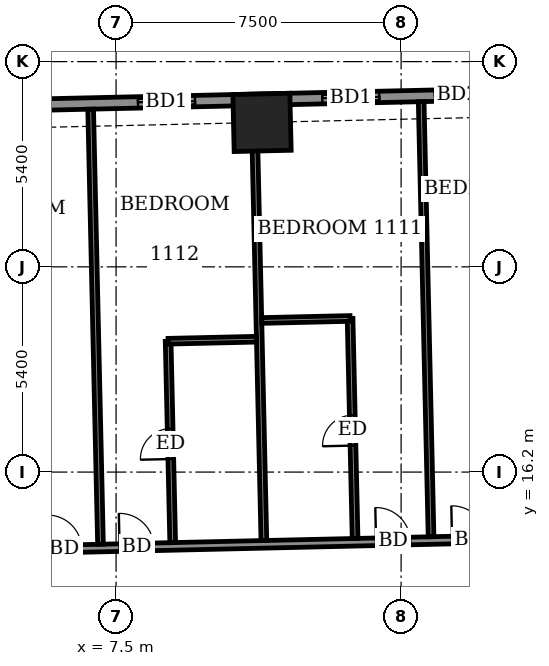
"""IFC4 building model, lengths in metres.
Left out: names, types, materials, properties, quantities, classifications, styles, units other than length and angle.
Written with IfcOpenShell. Run it as: python <this file> out.ifc"""

import sys

from ifc_helpers import new_model, si_unit, direction, frame, frame_2d, origin, origin_2d, place, context, subcontext, project, spatial, rectangle, extrude, element, fill, save


model = new_model("IFC4")
c1 = context("Model", 3, precision=1e-05, world=origin(), true_north=direction((0.0, 1.0)))
c2 = subcontext(c1, "Body", "Model", "MODEL_VIEW")
j1 = project(units=[si_unit("LENGTHUNIT", "METRE"), si_unit("PLANEANGLEUNIT", "RADIAN")], contexts=[c1])
p1 = place(None, origin())
s1 = spatial("IfcSite", under=j1, at=p1, CompositionType="ELEMENT")
p2 = place(p1, origin())
s2 = spatial("IfcBuilding", under=s1, at=p2, CompositionType="ELEMENT")
p3 = place(p2, frame((0.0, 0.0, 48.5)))
s3 = spatial("IfcBuildingStorey", under=s2, at=p3, CompositionType="ELEMENT", Elevation=48.5)
p4 = place(p3, frame((11.34, 25.4, -0.55), z_axis=(0.0, 0.0, 1.0), x_axis=(-0.999741952388, -0.022716263674, 0.0)))
e1 = element("IfcColumn", 1, at=p4, inside=s3, PredefinedType="COLUMN", context=c2, shape_type="SweptSolid", body=[
    extrude(rectangle(XDim=1.5, YDim=1.5, at=origin_2d()), origin(), (0.0, 0.0, 1.0), 3.6),
])
p5 = place(p3, frame((24.423, 26.298, 0.0), z_axis=(0.0, 0.0, 1.0), x_axis=(-0.999742433108, -0.022695097355, 0.0)))
e2 = element("IfcWall", 2, at=p5, inside=s3, PredefinedType="SOLIDWALL", context=c2, shape_type="SweptSolid", body=[
    extrude(rectangle(XDim=52.701, YDim=0.3, at=frame_2d((26.35, 0.0))), origin(), (0.0, 0.0, 1.0), 3.05),
])
p6 = place(p5, frame((2.009, 0.0, 0.0)))
e3 = element("IfcOpeningElement", 3, at=p6, cuts=e2, PredefinedType="OPENING", context=c2, shape_type="SweptSolid", body=[
    extrude(rectangle(XDim=1.5, YDim=2.4, at=frame_2d((0.75, 1.2))), frame((0.0, 0.16, 0.0), z_axis=(0.0, -1.0, 0.0), x_axis=(1.0, 0.0, 0.0)), (0.0, 0.0, 1.0), 0.32),
])
p7 = place(p5, frame((7.337, 0.0, 0.0)))
e4 = element("IfcOpeningElement", 4, at=p7, cuts=e2, PredefinedType="OPENING", context=c2, shape_type="SweptSolid", body=[
    extrude(rectangle(XDim=1.2, YDim=2.4, at=frame_2d((0.6, 1.2))), frame((0.0, 0.16, 0.0), z_axis=(0.0, -1.0, 0.0), x_axis=(1.0, 0.0, 0.0)), (0.0, 0.0, 1.0), 0.32),
])
p8 = place(p5, frame((10.0, 0.0, 0.0)))
e5 = element("IfcOpeningElement", 5, at=p8, cuts=e2, PredefinedType="OPENING", context=c2, shape_type="SweptSolid", body=[
    extrude(rectangle(XDim=1.5, YDim=2.4, at=frame_2d((0.75, 1.2))), frame((0.0, 0.16, 0.0), z_axis=(0.0, -1.0, 0.0), x_axis=(1.0, 0.0, 0.0)), (0.0, 0.0, 1.0), 0.32),
])
p9 = place(p5, frame((14.85, 0.0, 0.0)))
e6 = element("IfcOpeningElement", 6, at=p9, cuts=e2, PredefinedType="OPENING", context=c2, shape_type="SweptSolid", body=[
    extrude(rectangle(XDim=1.5, YDim=2.4, at=frame_2d((0.75, 1.2))), frame((0.0, 0.16, 0.0), z_axis=(0.0, -1.0, 0.0), x_axis=(1.0, 0.0, 0.0)), (0.0, 0.0, 1.0), 0.32),
])
p10 = place(p5, frame((20.638, 0.0, 0.9)))
e7 = element("IfcOpeningElement", 7, at=p10, cuts=e2, PredefinedType="OPENING", context=c2, shape_type="SweptSolid", body=[
    extrude(rectangle(XDim=0.9, YDim=1.5, at=frame_2d((0.45, 0.75))), frame((0.0, 0.16, 0.0), z_axis=(0.0, -1.0, 0.0), x_axis=(1.0, 0.0, 0.0)), (0.0, 0.0, 1.0), 0.32),
])
p11 = place(p5, frame((23.125, 0.0, 0.0)))
e8 = element("IfcOpeningElement", 8, at=p11, cuts=e2, PredefinedType="OPENING", context=c2, shape_type="SweptSolid", body=[
    extrude(rectangle(XDim=1.5, YDim=2.4, at=frame_2d((0.75, 1.2))), frame((0.0, 0.16, 0.0), z_axis=(0.0, -1.0, 0.0), x_axis=(1.0, 0.0, 0.0)), (0.0, 0.0, 1.0), 0.32),
])
p12 = place(p5, frame((27.9, 0.0, 0.0)))
e9 = element("IfcOpeningElement", 9, at=p12, cuts=e2, PredefinedType="OPENING", context=c2, shape_type="SweptSolid", body=[
    extrude(rectangle(XDim=1.5, YDim=2.4, at=frame_2d((0.75, 1.2))), frame((0.0, 0.16, 0.0), z_axis=(0.0, -1.0, 0.0), x_axis=(1.0, 0.0, 0.0)), (0.0, 0.0, 1.0), 0.32),
])
p13 = place(p5, frame((30.862, 0.0, 0.0)))
e10 = element("IfcOpeningElement", 10, at=p13, cuts=e2, PredefinedType="OPENING", context=c2, shape_type="SweptSolid", body=[
    extrude(rectangle(XDim=1.2, YDim=2.4, at=frame_2d((0.6, 1.2))), frame((0.0, 0.16, 0.0), z_axis=(0.0, -1.0, 0.0), x_axis=(1.0, 0.0, 0.0)), (0.0, 0.0, 1.0), 0.32),
])
p14 = place(p5, frame((36.1, 0.0, 0.0)))
e11 = element("IfcOpeningElement", 11, at=p14, cuts=e2, PredefinedType="OPENING", context=c2, shape_type="SweptSolid", body=[
    extrude(rectangle(XDim=1.5, YDim=2.4, at=frame_2d((0.75, 1.2))), frame((0.0, 0.16, 0.0), z_axis=(0.0, -1.0, 0.0), x_axis=(1.0, 0.0, 0.0)), (0.0, 0.0, 1.0), 0.32),
])
p15 = place(p5, frame((40.975, 0.0, 0.0)))
e12 = element("IfcOpeningElement", 12, at=p15, cuts=e2, PredefinedType="OPENING", context=c2, shape_type="SweptSolid", body=[
    extrude(rectangle(XDim=1.5, YDim=2.4, at=frame_2d((0.75, 1.2))), frame((0.0, 0.16, 0.0), z_axis=(0.0, -1.0, 0.0), x_axis=(1.0, 0.0, 0.0)), (0.0, 0.0, 1.0), 0.32),
])
p16 = place(p5, frame((43.788, 0.0, 0.0)))
e13 = element("IfcOpeningElement", 13, at=p16, cuts=e2, PredefinedType="OPENING", context=c2, shape_type="SweptSolid", body=[
    extrude(rectangle(XDim=1.5, YDim=2.4, at=frame_2d((0.75, 1.2))), frame((0.0, 0.16, 0.0), z_axis=(0.0, -1.0, 0.0), x_axis=(1.0, 0.0, 0.0)), (0.0, 0.0, 1.0), 0.32),
])
p17 = place(p5, frame((48.464, 0.0, 0.9)))
e14 = element("IfcOpeningElement", 14, at=p17, cuts=e2, PredefinedType="OPENING", context=c2, shape_type="SweptSolid", body=[
    extrude(rectangle(XDim=2.4, YDim=1.5, at=frame_2d((1.2, 0.75))), frame((0.0, 0.16, 0.0), z_axis=(0.0, -1.0, 0.0), x_axis=(1.0, 0.0, 0.0)), (0.0, 0.0, 1.0), 0.32),
])
p18 = place(p3, frame((7.744, 27.369, 0.0), z_axis=(0.0, 0.0, 1.0), x_axis=(0.999743178102, 0.022662255828, 0.0)))
e15 = element("IfcWall", 15, at=p18, inside=s3, PredefinedType="USERDEFINED", context=c2, shape_type="SweptSolid", body=[
    extrude(rectangle(XDim=6.0, YDim=0.55, at=frame_2d((3.0, 0.0))), origin(), (0.0, 0.0, 1.0), 0.8),
])
p19 = place(p3, frame((16.679, 12.918, 0.0), z_axis=(0.0, 0.0, 1.0), x_axis=(0.999742162372, 0.022707020428, 0.0)))
e16 = element("IfcWall", 16, at=p19, inside=s3, PredefinedType="PARTITIONING", context=c2, shape_type="SweptSolid", body=[
    extrude(rectangle(XDim=10.795, YDim=0.2, at=frame_2d((5.397, 0.0))), origin(), (0.0, 0.0, 1.0), 3.05),
])
p20 = place(p19, frame((5.598, 0.0, 0.0)))
e17 = element("IfcOpeningElement", 17, at=p20, cuts=e16, PredefinedType="OPENING", context=c2, shape_type="SweptSolid", body=[
    extrude(rectangle(XDim=1.0, YDim=2.1, at=frame_2d((0.5, 1.05))), frame((0.0, 0.11, 0.0), z_axis=(0.0, -1.0, 0.0), x_axis=(1.0, 0.0, 0.0)), (0.0, 0.0, 1.0), 0.22),
])
p21 = place(p3, frame((-31.347, 13.329, 0.0), z_axis=(0.0, 0.0, 1.0), x_axis=(0.999742613079, 0.022687168058, 0.0)))
e18 = element("IfcWall", 18, at=p21, inside=s3, PredefinedType="PARTITIONING", context=c2, shape_type="SweptSolid", body=[
    extrude(rectangle(XDim=58.799, YDim=0.2, at=frame_2d((29.399, 0.0))), origin(), (0.0, 0.0, 1.0), 3.05),
])
p22 = place(p21, frame((56.675, 0.0, 0.0)))
e19 = element("IfcOpeningElement", 19, at=p22, cuts=e18, PredefinedType="OPENING", context=c2, shape_type="SweptSolid", body=[
    extrude(rectangle(XDim=1.0, YDim=2.1, at=frame_2d((0.5, 1.05))), frame((0.0, 0.11, 0.0), z_axis=(0.0, -1.0, 0.0), x_axis=(1.0, 0.0, 0.0)), (0.0, 0.0, 1.0), 0.22),
])
p23 = place(p21, frame((52.4, 0.0, 0.0)))
e20 = element("IfcOpeningElement", 20, at=p23, cuts=e18, PredefinedType="OPENING", context=c2, shape_type="SweptSolid", body=[
    extrude(rectangle(XDim=0.9, YDim=2.1, at=frame_2d((0.45, 1.05))), frame((0.0, 0.11, 0.0), z_axis=(0.0, -1.0, 0.0), x_axis=(1.0, 0.0, 0.0)), (0.0, 0.0, 1.0), 0.22),
])
p24 = place(p21, frame((47.7, 0.0, 0.0)))
e21 = element("IfcOpeningElement", 21, at=p24, cuts=e18, PredefinedType="OPENING", context=c2, shape_type="SweptSolid", body=[
    extrude(rectangle(XDim=0.9, YDim=2.1, at=frame_2d((0.45, 1.05))), frame((0.0, 0.11, 0.0), z_axis=(0.0, -1.0, 0.0), x_axis=(1.0, 0.0, 0.0)), (0.0, 0.0, 1.0), 0.22),
])
p25 = place(p21, frame((45.7, 0.0, 0.0)))
e22 = element("IfcOpeningElement", 22, at=p25, cuts=e18, PredefinedType="OPENING", context=c2, shape_type="SweptSolid", body=[
    extrude(rectangle(XDim=0.9, YDim=2.1, at=frame_2d((0.45, 1.05))), frame((0.0, 0.11, 0.0), z_axis=(0.0, -1.0, 0.0), x_axis=(1.0, 0.0, 0.0)), (0.0, 0.0, 1.0), 0.22),
])
p26 = place(p21, frame((38.95, 0.0, 0.0)))
e23 = element("IfcOpeningElement", 23, at=p26, cuts=e18, PredefinedType="OPENING", context=c2, shape_type="SweptSolid", body=[
    extrude(rectangle(XDim=0.9, YDim=2.1, at=frame_2d((0.45, 1.05))), frame((0.0, 0.11, 0.0), z_axis=(0.0, -1.0, 0.0), x_axis=(1.0, 0.0, 0.0)), (0.0, 0.0, 1.0), 0.22),
])
p27 = place(p21, frame((37.05, 0.0, 0.0)))
e24 = element("IfcOpeningElement", 24, at=p27, cuts=e18, PredefinedType="OPENING", context=c2, shape_type="SweptSolid", body=[
    extrude(rectangle(XDim=0.9, YDim=2.1, at=frame_2d((0.45, 1.05))), frame((0.0, 0.11, 0.0), z_axis=(0.0, -1.0, 0.0), x_axis=(1.0, 0.0, 0.0)), (0.0, 0.0, 1.0), 0.22),
])
p28 = place(p21, frame((30.375, 0.0, 0.0)))
e25 = element("IfcOpeningElement", 25, at=p28, cuts=e18, PredefinedType="OPENING", context=c2, shape_type="SweptSolid", body=[
    extrude(rectangle(XDim=0.9, YDim=2.1, at=frame_2d((0.45, 1.05))), frame((0.0, 0.11, 0.0), z_axis=(0.0, -1.0, 0.0), x_axis=(1.0, 0.0, 0.0)), (0.0, 0.0, 1.0), 0.22),
])
p29 = place(p21, frame((28.5, 0.0, 0.0)))
e26 = element("IfcOpeningElement", 26, at=p29, cuts=e18, PredefinedType="OPENING", context=c2, shape_type="SweptSolid", body=[
    extrude(rectangle(XDim=0.9, YDim=2.1, at=frame_2d((0.45, 1.05))), frame((0.0, 0.11, 0.0), z_axis=(0.0, -1.0, 0.0), x_axis=(1.0, 0.0, 0.0)), (0.0, 0.0, 1.0), 0.22),
])
p30 = place(p21, frame((21.825, 0.0, 0.0)))
e27 = element("IfcOpeningElement", 27, at=p30, cuts=e18, PredefinedType="OPENING", context=c2, shape_type="SweptSolid", body=[
    extrude(rectangle(XDim=0.9, YDim=2.1, at=frame_2d((0.45, 1.05))), frame((0.0, 0.11, 0.0), z_axis=(0.0, -1.0, 0.0), x_axis=(1.0, 0.0, 0.0)), (0.0, 0.0, 1.0), 0.22),
])
p31 = place(p21, frame((19.95, 0.0, 0.0)))
e28 = element("IfcOpeningElement", 28, at=p31, cuts=e18, PredefinedType="OPENING", context=c2, shape_type="SweptSolid", body=[
    extrude(rectangle(XDim=0.9, YDim=2.1, at=frame_2d((0.45, 1.05))), frame((0.0, 0.11, 0.0), z_axis=(0.0, -1.0, 0.0), x_axis=(1.0, 0.0, 0.0)), (0.0, 0.0, 1.0), 0.22),
])
p32 = place(p21, frame((13.225, 0.0, 0.0)))
e29 = element("IfcOpeningElement", 29, at=p32, cuts=e18, PredefinedType="OPENING", context=c2, shape_type="SweptSolid", body=[
    extrude(rectangle(XDim=0.9, YDim=2.1, at=frame_2d((0.45, 1.05))), frame((0.0, 0.11, 0.0), z_axis=(0.0, -1.0, 0.0), x_axis=(1.0, 0.0, 0.0)), (0.0, 0.0, 1.0), 0.22),
])
p33 = place(p21, frame((11.25, 0.0, 0.0)))
e30 = element("IfcOpeningElement", 30, at=p33, cuts=e18, PredefinedType="OPENING", context=c2, shape_type="SweptSolid", body=[
    extrude(rectangle(XDim=0.9, YDim=2.1, at=frame_2d((0.45, 1.05))), frame((0.0, 0.11, 0.0), z_axis=(0.0, -1.0, 0.0), x_axis=(1.0, 0.0, 0.0)), (0.0, 0.0, 1.0), 0.22),
])
p34 = place(p21, frame((1.75, 0.0, 0.0)))
e31 = element("IfcOpeningElement", 31, at=p34, cuts=e18, PredefinedType="OPENING", context=c2, shape_type="SweptSolid", body=[
    extrude(rectangle(XDim=1.0, YDim=2.1, at=frame_2d((0.5, 1.05))), frame((0.0, 0.11, 0.0), z_axis=(0.0, -1.0, 0.0), x_axis=(1.0, 0.0, 0.0)), (0.0, 0.0, 1.0), 0.22),
])
p35 = place(p21, frame((6.65, 0.0, 0.0)))
e32 = element("IfcOpeningElement", 32, at=p35, cuts=e18, PredefinedType="OPENING", context=c2, shape_type="SweptSolid", body=[
    extrude(rectangle(XDim=0.9, YDim=2.1, at=frame_2d((0.45, 1.05))), frame((0.0, 0.11, 0.0), z_axis=(0.0, -1.0, 0.0), x_axis=(1.0, 0.0, 0.0)), (0.0, 0.0, 1.0), 0.22),
])
p36 = place(p3, frame((7.09, 14.301, 0.0), z_axis=(0.0, 0.0, 1.0), x_axis=(-0.022621153305, 0.999744108971, 0.0)))
e33 = element("IfcWall", 33, at=p36, inside=s3, PredefinedType="PARTITIONING", context=c2, shape_type="SweptSolid", body=[
    extrude(rectangle(XDim=11.451, YDim=0.15, at=frame_2d((5.726, 0.0))), origin(), (0.0, 0.0, 1.0), 2.55),
])
p37 = place(p3, frame((8.99, 14.344, 0.0), z_axis=(0.0, 0.0, 1.0), x_axis=(-0.022615729912, 0.999744231672, 0.0)))
e34 = element("IfcWall", 34, at=p37, inside=s3, PredefinedType="PARTITIONING", context=c2, shape_type="SweptSolid", body=[
    extrude(rectangle(XDim=5.301, YDim=0.15, at=frame_2d((2.65, 0.0))), origin(), (0.0, 0.0, 1.0), 3.05),
])
p38 = place(p37, frame((2.2, 0.0, 0.0)))
e35 = element("IfcOpeningElement", 35, at=p38, cuts=e34, PredefinedType="OPENING", context=c2, shape_type="SweptSolid", body=[
    extrude(rectangle(XDim=0.8, YDim=2.1, at=frame_2d((0.4, 1.05))), frame((0.0, 0.085, 0.0), z_axis=(0.0, -1.0, 0.0), x_axis=(1.0, 0.0, 0.0)), (0.0, 0.0, 1.0), 0.17),
])
p39 = place(p3, frame((11.389, 14.399, 0.0), z_axis=(0.0, 0.0, 1.0), x_axis=(-0.022708327922, 0.999742132674, 0.0)))
e36 = element("IfcWall", 36, at=p39, inside=s3, PredefinedType="PARTITIONING", context=c2, shape_type="SweptSolid", body=[
    extrude(rectangle(XDim=11.45, YDim=0.15, at=frame_2d((5.725, 0.0))), origin(), (0.0, 0.0, 1.0), 3.05),
])
p40 = place(p3, frame((13.789, 14.453, 0.0), z_axis=(0.0, 0.0, 1.0), x_axis=(-0.022809516176, 0.999739829141, 0.0)))
e37 = element("IfcWall", 37, at=p40, inside=s3, PredefinedType="PARTITIONING", context=c2, shape_type="SweptSolid", body=[
    extrude(rectangle(XDim=5.791, YDim=0.15, at=frame_2d((2.895, 0.0))), origin(), (0.0, 0.0, 1.0), 3.05),
])
p41 = place(p40, frame((2.445, 0.0, 0.0)))
e38 = element("IfcOpeningElement", 38, at=p41, cuts=e37, PredefinedType="OPENING", context=c2, shape_type="SweptSolid", body=[
    extrude(rectangle(XDim=0.8, YDim=2.1, at=frame_2d((0.4, 1.05))), frame((0.0, 0.085, 0.0), z_axis=(0.0, -1.0, 0.0), x_axis=(1.0, 0.0, 0.0)), (0.0, 0.0, 1.0), 0.17),
])
p42 = place(p3, frame((15.788, 14.499, 0.0), z_axis=(0.0, 0.0, 1.0), x_axis=(-0.022708327922, 0.999742132674, 0.0)))
e39 = element("IfcWall", 39, at=p42, inside=s3, PredefinedType="PARTITIONING", context=c2, shape_type="SweptSolid", body=[
    extrude(rectangle(XDim=11.45, YDim=0.15, at=frame_2d((5.725, 0.0))), origin(), (0.0, 0.0, 1.0), 2.55),
])
for number, where, z_axis, x_axis in (
    (40, (8.87, 19.643, 0.0), (0.0, 0.0, 1.0), (1.0, 0.023, 0.0)),
    (41, (11.333, 20.189, 0.0), (0.0, 0.0, 1.0), (1.0, 0.023, 0.0)),
):
    element("IfcWall", number, at=place(p3, frame(where, z_axis=z_axis, x_axis=x_axis)), inside=s3, PredefinedType="PARTITIONING", context=c2, shape_type="SweptSolid", body=[
        extrude(rectangle(XDim=2.324, YDim=0.15, at=frame_2d((1.162, 0.0))), origin(), (0.0, 0.0, 1.0), 3.05),
    ])
p43 = place(p7, origin())
e42 = element("IfcDoor", 42, at=p43, inside=s3, OperationType="SLIDING_TO_LEFT", PredefinedType="DOOR", context=c2, shape_type="SweptSolid", body=[
    extrude(rectangle(XDim=1.2, YDim=2.4, at=frame_2d((0.6, 1.2))), frame((0.0, 0.025, 0.0), z_axis=(0.0, -1.0, 0.0), x_axis=(1.0, 0.0, 0.0)), (0.0, 0.0, 1.0), 0.05),
])
fill(e4, e42)
p44 = place(p8, origin())
e43 = element("IfcDoor", 43, at=p44, inside=s3, OperationType="SLIDING_TO_LEFT", PredefinedType="DOOR", context=c2, shape_type="SweptSolid", body=[
    extrude(rectangle(XDim=1.5, YDim=2.4, at=frame_2d((0.75, 1.2))), frame((0.0, 0.025, 0.0), z_axis=(0.0, -1.0, 0.0), x_axis=(1.0, 0.0, 0.0)), (0.0, 0.0, 1.0), 0.05),
])
fill(e5, e43)
p45 = place(p9, origin())
e44 = element("IfcDoor", 44, at=p45, inside=s3, OperationType="SLIDING_TO_LEFT", PredefinedType="DOOR", context=c2, shape_type="SweptSolid", body=[
    extrude(rectangle(XDim=1.5, YDim=2.4, at=frame_2d((0.75, 1.2))), frame((0.0, 0.025, 0.0), z_axis=(0.0, -1.0, 0.0), x_axis=(1.0, 0.0, 0.0)), (0.0, 0.0, 1.0), 0.05),
])
fill(e6, e44)
p46 = place(p24, origin())
e45 = element("IfcDoor", 45, at=p46, inside=s3, OperationType="SINGLE_SWING_RIGHT", PredefinedType="DOOR", context=c2, shape_type="SweptSolid", body=[
    extrude(rectangle(XDim=0.9, YDim=2.1, at=frame_2d((0.45, 1.05))), frame((0.0, 0.025, 0.0), z_axis=(0.0, -1.0, 0.0), x_axis=(1.0, 0.0, 0.0)), (0.0, 0.0, 1.0), 0.05),
])
fill(e21, e45)
p47 = place(p25, origin())
e46 = element("IfcDoor", 46, at=p47, inside=s3, OperationType="SINGLE_SWING_LEFT", PredefinedType="DOOR", context=c2, shape_type="SweptSolid", body=[
    extrude(rectangle(XDim=0.9, YDim=2.1, at=frame_2d((0.45, 1.05))), frame((0.0, 0.025, 0.0), z_axis=(0.0, -1.0, 0.0), x_axis=(1.0, 0.0, 0.0)), (0.0, 0.0, 1.0), 0.05),
])
fill(e22, e46)
p48 = place(p41, origin())
e47 = element("IfcDoor", 47, at=p48, inside=s3, OperationType="SINGLE_SWING_LEFT", PredefinedType="DOOR", context=c2, shape_type="SweptSolid", body=[
    extrude(rectangle(XDim=0.8, YDim=2.1, at=frame_2d((0.4, 1.05))), frame((0.0, 0.025, 0.0), z_axis=(0.0, -1.0, 0.0), x_axis=(1.0, 0.0, 0.0)), (0.0, 0.0, 1.0), 0.05),
])
fill(e38, e47)
p49 = place(p26, origin())
e48 = element("IfcDoor", 48, at=p49, inside=s3, OperationType="SINGLE_SWING_RIGHT", PredefinedType="DOOR", context=c2, shape_type="SweptSolid", body=[
    extrude(rectangle(XDim=0.9, YDim=2.1, at=frame_2d((0.45, 1.05))), frame((0.0, 0.025, 0.0), z_axis=(0.0, -1.0, 0.0), x_axis=(1.0, 0.0, 0.0)), (0.0, 0.0, 1.0), 0.05),
])
fill(e23, e48)
p50 = place(p38, origin())
e49 = element("IfcDoor", 49, at=p50, inside=s3, OperationType="SINGLE_SWING_RIGHT", PredefinedType="DOOR", context=c2, shape_type="SweptSolid", body=[
    extrude(rectangle(XDim=0.8, YDim=2.1, at=frame_2d((0.4, 1.05))), frame((0.0, 0.025, 0.0), z_axis=(0.0, -1.0, 0.0), x_axis=(1.0, 0.0, 0.0)), (0.0, 0.0, 1.0), 0.05),
])
fill(e35, e49)
p51 = place(p27, origin())
e50 = element("IfcDoor", 50, at=p51, inside=s3, OperationType="SINGLE_SWING_LEFT", PredefinedType="DOOR", context=c2, shape_type="SweptSolid", body=[
    extrude(rectangle(XDim=0.9, YDim=2.1, at=frame_2d((0.45, 1.05))), frame((0.0, 0.025, 0.0), z_axis=(0.0, -1.0, 0.0), x_axis=(1.0, 0.0, 0.0)), (0.0, 0.0, 1.0), 0.05),
])
fill(e24, e50)
save(model, sys.argv[1])
